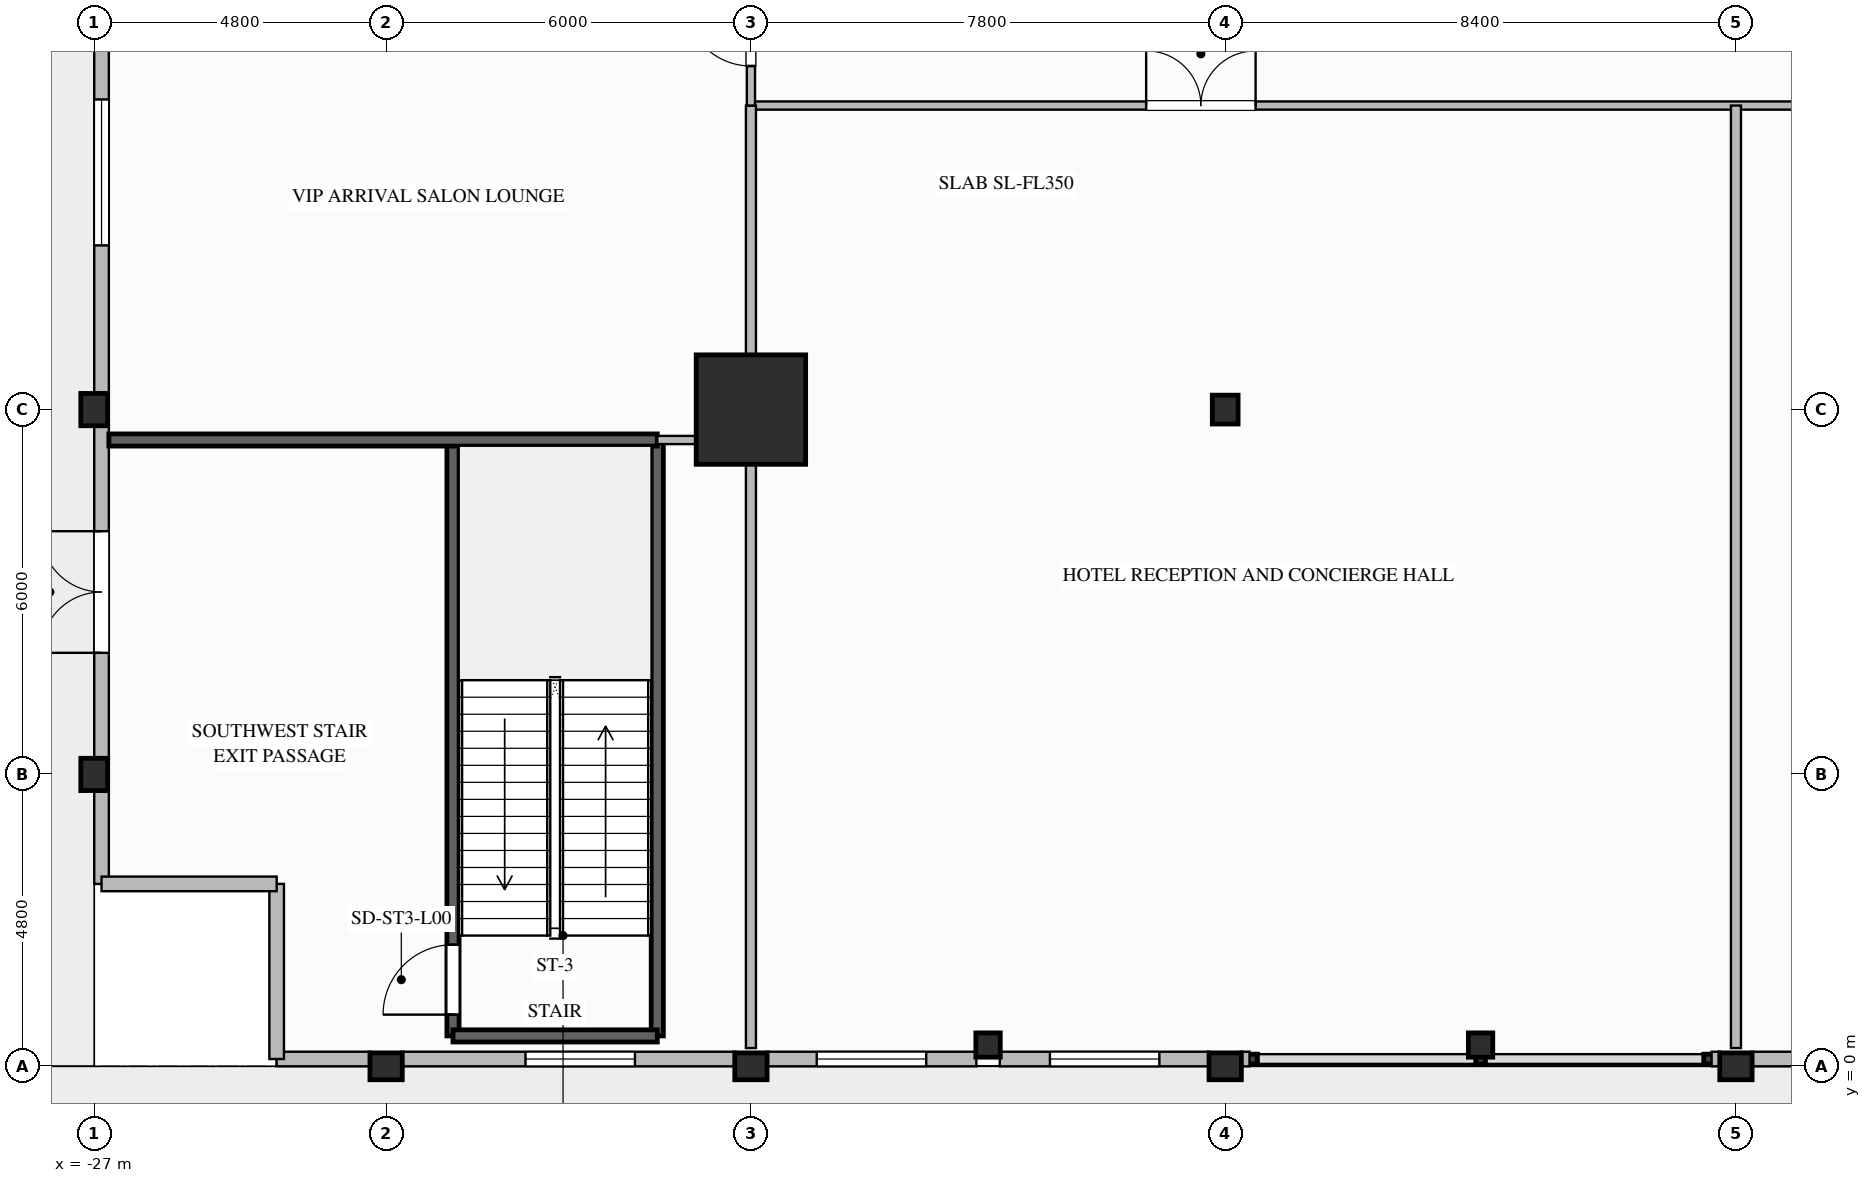
"""IFC4 building model, lengths in metres.
Left out: names, types, materials, properties, quantities, classifications, styles, units other than length and angle.
Written with IfcOpenShell. Run it as: python <this file> out.ifc"""

import sys

from ifc_helpers import new_model, si_unit, direction, frame, frame_2d, origin, origin_2d, place, context, subcontext, project, spatial, rectangle, i_section, extrude, element, fill, save


model = new_model("IFC4")
c1 = context("Model", 3, precision=1e-05, world=origin(), true_north=direction((0.0, 1.0)))
c2 = subcontext(c1, "Body", "Model", "MODEL_VIEW")
j1 = project(units=[si_unit("LENGTHUNIT", "METRE"), si_unit("PLANEANGLEUNIT", "RADIAN")], contexts=[c1])
p1 = place(None, origin())
s1 = spatial("IfcSite", under=j1, at=p1, CompositionType="ELEMENT")
p2 = place(p1, origin())
s2 = spatial("IfcBuilding", under=s1, at=p2, CompositionType="ELEMENT")
p3 = place(p2, origin())
s3 = spatial("IfcBuildingStorey", under=s2, at=p3, CompositionType="ELEMENT", Elevation=0.0)
p4 = place(p3, frame((-16.2, 10.8, 0.0), z_axis=(0.0, 0.0, 1.0), x_axis=(1.0, 0.0, 0.0)))
e1 = element("IfcColumn", 1, at=p4, inside=s3, PredefinedType="COLUMN", context=c2, shape_type="SweptSolid", body=[
    extrude(rectangle(XDim=1.8, YDim=1.8, at=origin_2d()), origin(), (0.0, 0.0, 1.0), 5.6),
])
for number, where, z_axis, x_axis in (
    (2, (-27.0, 4.8, 0.0), (0.0, 0.0, 1.0), (1.0, 0.0, 0.0)),
    (3, (-27.0, 10.8, 0.0), (0.0, 0.0, 1.0), (1.0, 0.0, 0.0)),
    (4, (-22.2, 0.0, 0.0), (0.0, 0.0, 1.0), (0.0, 1.0, 0.0)),
    (5, (-16.2, 0.0, 0.0), (0.0, 0.0, 1.0), (0.0, 1.0, 0.0)),
    (6, (-8.4, 0.0, 0.0), (0.0, 0.0, 1.0), (0.0, 1.0, 0.0)),
    (7, (0.0, 0.0, 0.0), (0.0, 0.0, 1.0), (0.0, 1.0, 0.0)),
):
    element("IfcColumn", number, at=place(p3, frame(where, z_axis=z_axis, x_axis=x_axis)), inside=s3, PredefinedType="COLUMN", context=c2, shape_type="SweptSolid", body=[
        extrude(i_section(OverallWidth=0.442, OverallDepth=0.531, WebThickness=0.066, FlangeThickness=0.106, FilletRadius=0.03, at=origin_2d()), origin(), (0.0, 0.0, 1.0), 5.6),
    ])
p5 = place(p3, frame((-8.4, 10.8, 0.0), z_axis=(0.0, 0.0, 1.0), x_axis=(1.0, 0.0, 0.0)))
e8 = element("IfcColumn", 8, at=p5, inside=s3, PredefinedType="COLUMN", context=c2, shape_type="SweptSolid", body=[
    extrude(i_section(OverallWidth=0.424, OverallDepth=0.474, WebThickness=0.048, FlangeThickness=0.077, FilletRadius=0.03, at=origin_2d()), origin(), (0.0, 0.0, 1.0), 5.6),
])
for number, where, z_axis, x_axis in (
    (9, (-12.3, 0.35, 0.0), (0.0, 0.0, 1.0), (1.0, 0.0, 0.0)),
    (10, (-4.2, 0.35, 0.0), (0.0, 0.0, 1.0), (1.0, 0.0, 0.0)),
):
    element("IfcColumn", number, at=place(p3, frame(where, z_axis=z_axis, x_axis=x_axis)), inside=s3, PredefinedType="COLUMN", context=c2, shape_type="SweptSolid", body=[
        extrude(i_section(OverallWidth=0.401, OverallDepth=0.399, WebThickness=0.025, FlangeThickness=0.04, FilletRadius=0.025, at=origin_2d()), origin(), (0.0, 0.0, 1.0), 5.6),
    ])
p6 = place(p3, frame((-26.88, 3.0, 0.0), z_axis=(0.0, 0.0, 1.0), x_axis=(0.0, 1.0, 0.0)))
e11 = element("IfcWall", 11, at=p6, inside=s3, PredefinedType="STANDARD", context=c2, shape_type="SweptSolid", body=[
    extrude(rectangle(XDim=1.542, YDim=0.24, at=frame_2d((0.771, 0.0))), origin(), (0.0, 0.0, 1.0), 5.3),
])
p7 = place(p3, frame((-26.88, 5.058, 0.0), z_axis=(0.0, 0.0, 1.0), x_axis=(0.0, 1.0, 0.0)))
e12 = element("IfcWall", 12, at=p7, inside=s3, PredefinedType="STANDARD", context=c2, shape_type="SweptSolid", body=[
    extrude(rectangle(XDim=5.485, YDim=0.24, at=frame_2d((2.742, 0.0))), origin(), (0.0, 0.0, 1.0), 4.604),
])
p8 = place(p7, frame((1.742, 0.0, 0.0)))
e13 = element("IfcOpeningElement", 13, at=p8, cuts=e12, PredefinedType="OPENING", context=c2, shape_type="SweptSolid", body=[
    extrude(rectangle(XDim=2.0, YDim=2.4, at=frame_2d((1.0, 1.2))), frame((0.0, 0.13, 0.0), z_axis=(0.0, -1.0, 0.0), x_axis=(1.0, 0.0, 0.0)), (0.0, 0.0, 1.0), 0.26),
])
p9 = place(p3, frame((-26.88, 11.058, 0.0), z_axis=(0.0, 0.0, 1.0), x_axis=(0.0, 1.0, 0.0)))
e14 = element("IfcWall", 14, at=p9, inside=s3, PredefinedType="STANDARD", context=c2, shape_type="SweptSolid", body=[
    extrude(rectangle(XDim=7.285, YDim=0.24, at=frame_2d((3.642, 0.0))), origin(), (0.0, 0.0, 1.0), 4.604),
])
p10 = place(p9, frame((2.442, 0.0, 0.9)))
e15 = element("IfcOpeningElement", 15, at=p10, cuts=e14, PredefinedType="OPENING", context=c2, shape_type="SweptSolid", body=[
    extrude(rectangle(XDim=2.4, YDim=2.6, at=frame_2d((1.2, 1.3))), frame((0.0, 0.13, 0.0), z_axis=(0.0, -1.0, 0.0), x_axis=(1.0, 0.0, 0.0)), (0.0, 0.0, 1.0), 0.26),
])
p11 = place(p3, frame((-22.458, 0.12, 0.0), z_axis=(0.0, 0.0, 1.0), x_axis=(-1.0, 0.0, 0.0)))
e16 = element("IfcWall", 16, at=p11, inside=s3, PredefinedType="STANDARD", context=c2, shape_type="SweptSolid", body=[
    extrude(rectangle(XDim=1.542, YDim=0.24, at=frame_2d((0.771, 0.0))), origin(), (0.0, 0.0, 1.0), 5.3),
])
p12 = place(p3, frame((-16.458, 0.12, 0.0), z_axis=(0.0, 0.0, 1.0), x_axis=(-1.0, 0.0, 0.0)))
e17 = element("IfcWall", 17, at=p12, inside=s3, PredefinedType="STANDARD", context=c2, shape_type="SweptSolid", body=[
    extrude(rectangle(XDim=5.485, YDim=0.24, at=frame_2d((2.742, 0.0))), origin(), (0.0, 0.0, 1.0), 4.604),
])
p13 = place(p12, frame((1.65, 0.0, 0.65)))
e18 = element("IfcOpeningElement", 18, at=p13, cuts=e17, PredefinedType="OPENING", context=c2, shape_type="SweptSolid", body=[
    extrude(rectangle(XDim=1.8, YDim=2.2, at=frame_2d((0.9, 1.1))), frame((0.0, 0.13, 0.0), z_axis=(0.0, -1.0, 0.0), x_axis=(1.0, 0.0, 0.0)), (0.0, 0.0, 1.0), 0.26),
])
p14 = place(p3, frame((-12.493, 0.12, 0.0), z_axis=(0.0, 0.0, 1.0), x_axis=(-1.0, 0.0, 0.0)))
e19 = element("IfcWall", 19, at=p14, inside=s3, PredefinedType="STANDARD", context=c2, shape_type="SweptSolid", body=[
    extrude(rectangle(XDim=3.45, YDim=0.24, at=frame_2d((1.725, 0.0))), origin(), (0.0, 0.0, 1.0), 4.604),
])
p15 = place(p14, frame((0.825, 0.0, 0.65)))
e20 = element("IfcOpeningElement", 20, at=p15, cuts=e19, PredefinedType="OPENING", context=c2, shape_type="SweptSolid", body=[
    extrude(rectangle(XDim=1.8, YDim=2.2, at=frame_2d((0.9, 1.1))), frame((0.0, 0.13, 0.0), z_axis=(0.0, -1.0, 0.0), x_axis=(1.0, 0.0, 0.0)), (0.0, 0.0, 1.0), 0.26),
])
p16 = place(p3, frame((-8.658, 0.12, 0.0), z_axis=(0.0, 0.0, 1.0), x_axis=(-1.0, 0.0, 0.0)))
e21 = element("IfcWall", 21, at=p16, inside=s3, PredefinedType="STANDARD", context=c2, shape_type="SweptSolid", body=[
    extrude(rectangle(XDim=3.45, YDim=0.24, at=frame_2d((1.725, 0.0))), origin(), (0.0, 0.0, 1.0), 4.604),
])
p17 = place(p16, frame((0.825, 0.0, 0.65)))
e22 = element("IfcOpeningElement", 22, at=p17, cuts=e21, PredefinedType="OPENING", context=c2, shape_type="SweptSolid", body=[
    extrude(rectangle(XDim=1.8, YDim=2.2, at=frame_2d((0.9, 1.1))), frame((0.0, 0.13, 0.0), z_axis=(0.0, -1.0, 0.0), x_axis=(1.0, 0.0, 0.0)), (0.0, 0.0, 1.0), 0.26),
])
p18 = place(p3, frame((-8.0, 0.12, 0.0), z_axis=(0.0, 0.0, 1.0), x_axis=(-1.0, 0.0, 0.0)))
e23 = element("IfcWall", 23, at=p18, inside=s3, PredefinedType="STANDARD", context=c2, shape_type="SweptSolid", body=[
    extrude(rectangle(XDim=0.142, YDim=0.24, at=frame_2d((0.071, 0.0))), origin(), (0.0, 0.0, 1.0), 5.3),
])
p19 = place(p3, frame((-0.258, 0.12, 0.0), z_axis=(0.0, 0.0, 1.0), x_axis=(-1.0, 0.0, 0.0)))
e24 = element("IfcWall", 24, at=p19, inside=s3, PredefinedType="STANDARD", context=c2, shape_type="SweptSolid", body=[
    extrude(rectangle(XDim=0.142, YDim=0.24, at=frame_2d((0.071, 0.0))), origin(), (0.0, 0.0, 1.0), 5.3),
])
p20 = place(p3, frame((4.007, 0.12, 0.0), z_axis=(0.0, 0.0, 1.0), x_axis=(-1.0, 0.0, 0.0)))
e25 = element("IfcWall", 25, at=p20, inside=s3, PredefinedType="STANDARD", context=c2, shape_type="SweptSolid", body=[
    extrude(rectangle(XDim=3.75, YDim=0.24, at=frame_2d((1.875, 0.0))), origin(), (0.0, 0.0, 1.0), 4.604),
])
p21 = place(p20, frame((0.975, 0.0, 0.65)))
e26 = element("IfcOpeningElement", 26, at=p21, cuts=e25, PredefinedType="OPENING", context=c2, shape_type="SweptSolid", body=[
    extrude(rectangle(XDim=1.8, YDim=2.2, at=frame_2d((0.9, 1.1))), frame((0.0, 0.13, 0.0), z_axis=(0.0, -1.0, 0.0), x_axis=(1.0, 0.0, 0.0)), (0.0, 0.0, 1.0), 0.26),
])
for number, where, z_axis, x_axis in (
    (27, (-24.0, 0.12, 0.0), (0.0, 0.0, 1.0), (0.0, 1.0, 0.0)),
    (28, (-24.0, 3.0, 0.0), (0.0, 0.0, 1.0), (-1.0, 0.0, 0.0)),
):
    element("IfcWall", number, at=place(p3, frame(where, z_axis=z_axis, x_axis=x_axis)), inside=s3, PredefinedType="STANDARD", context=c2, shape_type="SweptSolid", body=[
        extrude(rectangle(XDim=2.88, YDim=0.24, at=frame_2d((1.44, 0.0))), origin(), (0.0, 0.0, 1.0), 5.3),
    ])
p22 = place(p3, frame((-21.1, 0.5, 0.0), z_axis=(0.0, 0.0, 1.0), x_axis=(0.0, 1.0, 0.0)))
e29 = element("IfcWall", 29, at=p22, inside=s3, PredefinedType="SOLIDWALL", context=c2, shape_type="SweptSolid", body=[
    extrude(rectangle(XDim=9.8, YDim=0.2, at=frame_2d((4.9, 0.0))), origin(), (0.0, 0.0, 1.0), 5.3),
])
p23 = place(p22, frame((0.35, 0.0, 0.0)))
e30 = element("IfcOpeningElement", 30, at=p23, cuts=e29, PredefinedType="OPENING", context=c2, shape_type="SweptSolid", body=[
    extrude(rectangle(XDim=1.15, YDim=2.15, at=frame_2d((0.575, 1.075))), frame((0.0, 0.11, 0.0), z_axis=(0.0, -1.0, 0.0), x_axis=(1.0, 0.0, 0.0)), (0.0, 0.0, 1.0), 0.22),
])
p24 = place(p3, frame((-17.74, 10.3, 0.0), z_axis=(0.0, 0.0, 1.0), x_axis=(0.0, -1.0, 0.0)))
e31 = element("IfcWall", 31, at=p24, inside=s3, PredefinedType="SOLIDWALL", context=c2, shape_type="SweptSolid", body=[
    extrude(rectangle(XDim=9.8, YDim=0.2, at=frame_2d((4.9, 0.0))), origin(), (0.0, 0.0, 1.0), 5.3),
])
p25 = place(p3, frame((-21.1, 0.5, 0.0), z_axis=(0.0, 0.0, 1.0), x_axis=(1.0, 0.0, 0.0)))
e32 = element("IfcWall", 32, at=p25, inside=s3, PredefinedType="SOLIDWALL", context=c2, shape_type="SweptSolid", body=[
    extrude(rectangle(XDim=3.36, YDim=0.2, at=frame_2d((1.68, 0.0))), origin(), (0.0, 0.0, 1.0), 5.3),
])
p26 = place(p3, frame((-26.76, 10.3, 0.0), z_axis=(0.0, 0.0, 1.0), x_axis=(1.0, 0.0, 0.0)))
e33 = element("IfcWall", 33, at=p26, inside=s3, PredefinedType="SOLIDWALL", context=c2, shape_type="SweptSolid", body=[
    extrude(rectangle(XDim=9.02, YDim=0.2, at=frame_2d((4.51, 0.0))), origin(), (0.0, 0.0, 1.0), 5.3),
])
p27 = place(p3, frame((-16.2, 15.8, 0.0), z_axis=(0.0, 0.0, 1.0), x_axis=(1.0, 0.0, 0.0)))
e34 = element("IfcWall", 34, at=p27, inside=s3, PredefinedType="PARTITIONING", context=c2, shape_type="SweptSolid", body=[
    extrude(rectangle(XDim=32.4, YDim=0.135, at=frame_2d((16.2, 0.0))), origin(), (0.0, 0.0, 1.0), 5.3),
])
p28 = place(p27, frame((6.5, 0.0, 0.0)))
e35 = element("IfcOpeningElement", 35, at=p28, cuts=e34, PredefinedType="OPENING", context=c2, shape_type="SweptSolid", body=[
    extrude(rectangle(XDim=1.8, YDim=2.35, at=frame_2d((0.9, 1.175))), frame((0.0, 0.077, 0.0), z_axis=(0.0, -1.0, 0.0), x_axis=(1.0, 0.0, 0.0)), (0.0, 0.0, 1.0), 0.155),
])
p29 = place(p27, frame((22.0, 0.0, 0.0)))
e36 = element("IfcOpeningElement", 36, at=p29, cuts=e34, PredefinedType="OPENING", context=c2, shape_type="SweptSolid", body=[
    extrude(rectangle(XDim=1.8, YDim=2.35, at=frame_2d((0.9, 1.175))), frame((0.0, 0.077, 0.0), z_axis=(0.0, -1.0, 0.0), x_axis=(1.0, 0.0, 0.0)), (0.0, 0.0, 1.0), 0.155),
])
p30 = place(p3, frame((-16.2, 0.3, 0.0), z_axis=(0.0, 0.0, 1.0), x_axis=(0.0, 1.0, 0.0)))
e37 = element("IfcWall", 37, at=p30, inside=s3, PredefinedType="PARTITIONING", context=c2, shape_type="SweptSolid", body=[
    extrude(rectangle(XDim=15.5, YDim=0.165, at=frame_2d((7.75, 0.0))), origin(), (0.0, 0.0, 1.0), 4.337),
])
p31 = place(p3, frame((0.0, 0.3, 0.0), z_axis=(0.0, 0.0, 1.0), x_axis=(0.0, 1.0, 0.0)))
e38 = element("IfcWall", 38, at=p31, inside=s3, PredefinedType="PARTITIONING", context=c2, shape_type="SweptSolid", body=[
    extrude(rectangle(XDim=15.5, YDim=0.165, at=frame_2d((7.75, 0.0))), origin(), (0.0, 0.0, 1.0), 4.248),
])
p32 = place(p3, frame((-17.74, 10.3, 0.0), z_axis=(0.0, 0.0, 1.0), x_axis=(1.0, 0.0, 0.0)))
e39 = element("IfcWall", 39, at=p32, inside=s3, PredefinedType="PARTITIONING", context=c2, shape_type="SweptSolid", body=[
    extrude(rectangle(XDim=1.54, YDim=0.135, at=frame_2d((0.77, 0.0))), origin(), (0.0, 0.0, 1.0), 5.3),
])
p33 = place(p3, frame((-16.2, 15.8, 0.0), z_axis=(0.0, 0.0, 1.0), x_axis=(0.0, 1.0, 0.0)))
e40 = element("IfcWall", 40, at=p33, inside=s3, PredefinedType="PARTITIONING", context=c2, shape_type="SweptSolid", body=[
    extrude(rectangle(XDim=2.5, YDim=0.135, at=frame_2d((1.25, 0.0))), origin(), (0.0, 0.0, 1.0), 4.337),
])
p34 = place(p33, frame((0.65, 0.0, 0.0)))
e41 = element("IfcOpeningElement", 41, at=p34, cuts=e40, PredefinedType="OPENING", context=c2, shape_type="SweptSolid", body=[
    extrude(rectangle(XDim=1.08, YDim=2.04, at=frame_2d((0.54, 1.02))), frame((0.0, 0.077, 0.0), z_axis=(0.0, -1.0, 0.0), x_axis=(1.0, 0.0, 0.0)), (0.0, 0.0, 1.0), 0.155),
])
p35 = place(p8, origin())
e42 = element("IfcDoor", 42, at=p35, inside=s3, OperationType="DOUBLE_DOOR_SINGLE_SWING", PredefinedType="DOOR", context=c2, shape_type="SweptSolid", body=[
    extrude(rectangle(XDim=2.0, YDim=2.4, at=frame_2d((1.0, 1.2))), frame((0.0, 0.025, 0.0), z_axis=(0.0, -1.0, 0.0), x_axis=(1.0, 0.0, 0.0)), (0.0, 0.0, 1.0), 0.05),
])
fill(e13, e42)
p36 = place(p10, origin())
e43 = element("IfcWindow", 43, at=p36, inside=s3, PartitioningType="SINGLE_PANEL", PredefinedType="WINDOW", context=c2, shape_type="SweptSolid", body=[
    extrude(rectangle(XDim=2.4, YDim=2.6, at=frame_2d((1.2, 1.3))), frame((0.0, 0.03, 0.0), z_axis=(0.0, -1.0, 0.0), x_axis=(1.0, 0.0, 0.0)), (0.0, 0.0, 1.0), 0.06),
])
fill(e15, e43)
p37 = place(p13, origin())
e44 = element("IfcWindow", 44, at=p37, inside=s3, PartitioningType="SINGLE_PANEL", PredefinedType="WINDOW", context=c2, shape_type="SweptSolid", body=[
    extrude(rectangle(XDim=1.8, YDim=2.2, at=frame_2d((0.9, 1.1))), frame((0.0, 0.03, 0.0), z_axis=(0.0, -1.0, 0.0), x_axis=(1.0, 0.0, 0.0)), (0.0, 0.0, 1.0), 0.06),
])
fill(e18, e44)
p38 = place(p15, origin())
e45 = element("IfcWindow", 45, at=p38, inside=s3, PartitioningType="SINGLE_PANEL", PredefinedType="WINDOW", context=c2, shape_type="SweptSolid", body=[
    extrude(rectangle(XDim=1.8, YDim=2.2, at=frame_2d((0.9, 1.1))), frame((0.0, 0.03, 0.0), z_axis=(0.0, -1.0, 0.0), x_axis=(1.0, 0.0, 0.0)), (0.0, 0.0, 1.0), 0.06),
])
fill(e20, e45)
p39 = place(p17, origin())
e46 = element("IfcWindow", 46, at=p39, inside=s3, PartitioningType="SINGLE_PANEL", PredefinedType="WINDOW", context=c2, shape_type="SweptSolid", body=[
    extrude(rectangle(XDim=1.8, YDim=2.2, at=frame_2d((0.9, 1.1))), frame((0.0, 0.03, 0.0), z_axis=(0.0, -1.0, 0.0), x_axis=(1.0, 0.0, 0.0)), (0.0, 0.0, 1.0), 0.06),
])
fill(e22, e46)
p40 = place(p23, origin())
e47 = element("IfcDoor", 47, at=p40, inside=s3, OperationType="SINGLE_SWING_LEFT", PredefinedType="DOOR", context=c2, shape_type="SweptSolid", body=[
    extrude(rectangle(XDim=1.15, YDim=2.15, at=frame_2d((0.575, 1.075))), frame((0.0, 0.025, 0.0), z_axis=(0.0, -1.0, 0.0), x_axis=(1.0, 0.0, 0.0)), (0.0, 0.0, 1.0), 0.05),
])
fill(e30, e47)
p41 = place(p28, origin())
e48 = element("IfcDoor", 48, at=p41, inside=s3, OperationType="DOUBLE_DOOR_SINGLE_SWING", PredefinedType="DOOR", context=c2, shape_type="SweptSolid", body=[
    extrude(rectangle(XDim=1.8, YDim=2.35, at=frame_2d((0.9, 1.175))), frame((0.0, 0.025, 0.0), z_axis=(0.0, -1.0, 0.0), x_axis=(1.0, 0.0, 0.0)), (0.0, 0.0, 1.0), 0.05),
])
fill(e35, e48)
p42 = place(p34, origin())
e49 = element("IfcDoor", 49, at=p42, inside=s3, OperationType="SINGLE_SWING_RIGHT", PredefinedType="DOOR", context=c2, shape_type="SweptSolid", body=[
    extrude(rectangle(XDim=1.08, YDim=2.04, at=frame_2d((0.54, 1.02))), frame((0.0, 0.025, 0.0), z_axis=(0.0, -1.0, 0.0), x_axis=(1.0, 0.0, 0.0)), (0.0, 0.0, 1.0), 0.05),
])
fill(e41, e49)
save(model, sys.argv[1])
